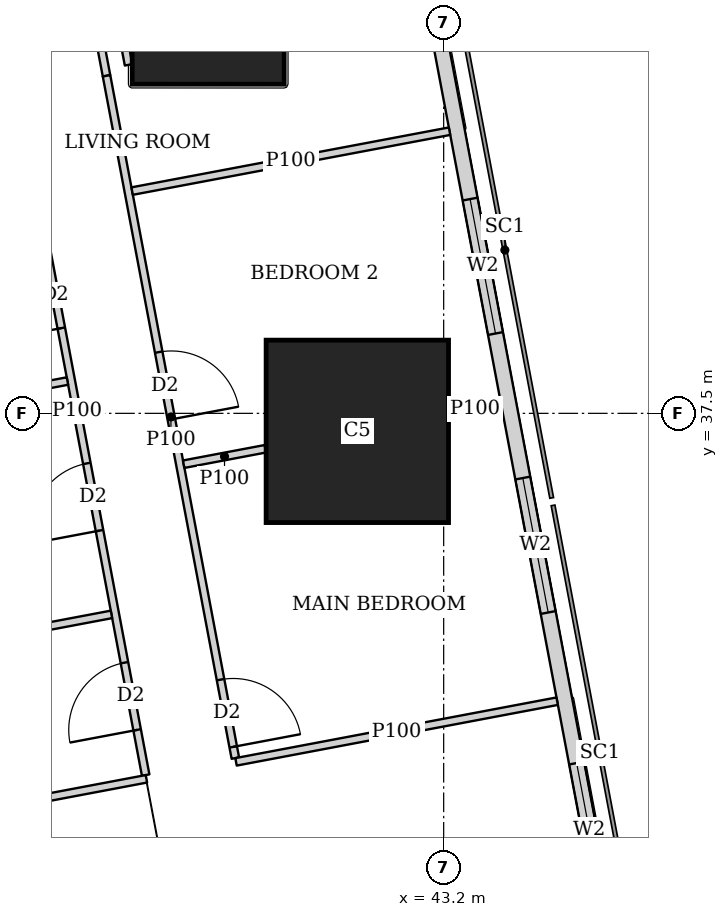
"""IFC4 building model, lengths in metres.
Left out: names, types, materials, properties, quantities, classifications, styles, units other than length and angle.
Written with IfcOpenShell. Run it as: python <this file> out.ifc"""

import sys

from ifc_helpers import new_model, si_unit, direction, frame, frame_2d, origin, origin_2d, place, context, subcontext, project, spatial, rectangle, extrude, element, fill, save


model = new_model("IFC4")
c1 = context("Model", 3, precision=1e-05, world=origin(), true_north=direction((0.0, 1.0)))
c2 = subcontext(c1, "Body", "Model", "MODEL_VIEW")
j1 = project(units=[si_unit("LENGTHUNIT", "METRE"), si_unit("PLANEANGLEUNIT", "RADIAN")], contexts=[c1])
p1 = place(None, origin())
s1 = spatial("IfcSite", under=j1, at=p1, CompositionType="ELEMENT")
p2 = place(p1, origin())
s2 = spatial("IfcBuilding", under=s1, at=p2, CompositionType="ELEMENT")
p3 = place(p2, frame((0.0, 0.0, 242.45)))
s3 = spatial("IfcBuildingStorey", under=s2, at=p3, CompositionType="ELEMENT", Elevation=242.45)
p4 = place(p3, frame((42.064, 37.263, 0.0), z_axis=(0.0, 0.0, 1.0), x_axis=(1.0, 0.0, 0.0)))
e1 = element("IfcColumn", 1, at=p4, inside=s3, PredefinedType="COLUMN", context=c2, shape_type="SweptSolid", body=[
    extrude(rectangle(XDim=2.4, YDim=2.4, at=origin_2d()), origin(), (0.0, 0.0, 1.0), 3.75),
])
p5 = place(p3, frame((40.102, 42.83, 0.0), z_axis=(0.0, 0.0, 1.0), x_axis=(1.0, 0.0, 0.0)))
e2 = element("IfcColumn", 2, at=p5, inside=s3, PredefinedType="COLUMN", context=c2, shape_type="SweptSolid", body=[
    extrude(rectangle(XDim=2.0, YDim=2.0, at=origin_2d()), origin(), (0.0, 0.0, 1.0), 3.75),
])
p6 = place(p3, frame((50.653, 2.703, 0.0), z_axis=(0.0, 0.0, 1.0), x_axis=(-0.185612026696, 0.982623109613, 0.0)))
e3 = element("IfcWall", 3, at=p6, inside=s3, PredefinedType="SOLIDWALL", context=c2, shape_type="SweptSolid", body=[
    extrude(rectangle(XDim=41.393, YDim=0.2, at=frame_2d((20.697, 0.0))), origin(), (0.0, 0.0, 1.0), 3.45),
])
p7 = place(p6, frame((1.633, 0.0, 0.9)))
e4 = element("IfcOpeningElement", 4, at=p7, cuts=e3, PredefinedType="OPENING", context=c2, shape_type="SweptSolid", body=[
    extrude(rectangle(XDim=1.8, YDim=1.5, at=frame_2d((0.9, 0.75))), frame((0.0, 0.11, 0.0), z_axis=(0.0, -1.0, 0.0), x_axis=(1.0, 0.0, 0.0)), (0.0, 0.0, 1.0), 0.22),
])
p8 = place(p6, frame((6.032, 0.0, 0.9)))
e5 = element("IfcOpeningElement", 5, at=p8, cuts=e3, PredefinedType="OPENING", context=c2, shape_type="SweptSolid", body=[
    extrude(rectangle(XDim=1.8, YDim=1.5, at=frame_2d((0.9, 0.75))), frame((0.0, 0.11, 0.0), z_axis=(0.0, -1.0, 0.0), x_axis=(1.0, 0.0, 0.0)), (0.0, 0.0, 1.0), 0.22),
])
p9 = place(p6, frame((9.848, 0.0, 0.9)))
e6 = element("IfcOpeningElement", 6, at=p9, cuts=e3, PredefinedType="OPENING", context=c2, shape_type="SweptSolid", body=[
    extrude(rectangle(XDim=1.8, YDim=1.5, at=frame_2d((0.9, 0.75))), frame((0.0, 0.11, 0.0), z_axis=(0.0, -1.0, 0.0), x_axis=(1.0, 0.0, 0.0)), (0.0, 0.0, 1.0), 0.22),
])
p10 = place(p6, frame((13.664, 0.0, 0.9)))
e7 = element("IfcOpeningElement", 7, at=p10, cuts=e3, PredefinedType="OPENING", context=c2, shape_type="SweptSolid", body=[
    extrude(rectangle(XDim=1.8, YDim=1.5, at=frame_2d((0.9, 0.75))), frame((0.0, 0.11, 0.0), z_axis=(0.0, -1.0, 0.0), x_axis=(1.0, 0.0, 0.0)), (0.0, 0.0, 1.0), 0.22),
])
p11 = place(p6, frame((17.481, 0.0, 0.9)))
e8 = element("IfcOpeningElement", 8, at=p11, cuts=e3, PredefinedType="OPENING", context=c2, shape_type="SweptSolid", body=[
    extrude(rectangle(XDim=1.8, YDim=1.5, at=frame_2d((0.9, 0.75))), frame((0.0, 0.11, 0.0), z_axis=(0.0, -1.0, 0.0), x_axis=(1.0, 0.0, 0.0)), (0.0, 0.0, 1.0), 0.22),
])
p12 = place(p6, frame((21.297, 0.0, 0.9)))
e9 = element("IfcOpeningElement", 9, at=p12, cuts=e3, PredefinedType="OPENING", context=c2, shape_type="SweptSolid", body=[
    extrude(rectangle(XDim=1.8, YDim=1.5, at=frame_2d((0.9, 0.75))), frame((0.0, 0.11, 0.0), z_axis=(0.0, -1.0, 0.0), x_axis=(1.0, 0.0, 0.0)), (0.0, 0.0, 1.0), 0.22),
])
p13 = place(p6, frame((25.113, 0.0, 0.9)))
e10 = element("IfcOpeningElement", 10, at=p13, cuts=e3, PredefinedType="OPENING", context=c2, shape_type="SweptSolid", body=[
    extrude(rectangle(XDim=1.8, YDim=1.5, at=frame_2d((0.9, 0.75))), frame((0.0, 0.11, 0.0), z_axis=(0.0, -1.0, 0.0), x_axis=(1.0, 0.0, 0.0)), (0.0, 0.0, 1.0), 0.22),
])
p14 = place(p6, frame((28.93, 0.0, 0.9)))
e11 = element("IfcOpeningElement", 11, at=p14, cuts=e3, PredefinedType="OPENING", context=c2, shape_type="SweptSolid", body=[
    extrude(rectangle(XDim=1.8, YDim=1.5, at=frame_2d((0.9, 0.75))), frame((0.0, 0.11, 0.0), z_axis=(0.0, -1.0, 0.0), x_axis=(1.0, 0.0, 0.0)), (0.0, 0.0, 1.0), 0.22),
])
p15 = place(p6, frame((32.746, 0.0, 0.9)))
e12 = element("IfcOpeningElement", 12, at=p15, cuts=e3, PredefinedType="OPENING", context=c2, shape_type="SweptSolid", body=[
    extrude(rectangle(XDim=1.8, YDim=1.5, at=frame_2d((0.9, 0.75))), frame((0.0, 0.11, 0.0), z_axis=(0.0, -1.0, 0.0), x_axis=(1.0, 0.0, 0.0)), (0.0, 0.0, 1.0), 0.22),
])
p16 = place(p6, frame((36.481, 0.0, 0.9)))
e13 = element("IfcOpeningElement", 13, at=p16, cuts=e3, PredefinedType="OPENING", context=c2, shape_type="SweptSolid", body=[
    extrude(rectangle(XDim=1.8, YDim=1.5, at=frame_2d((0.9, 0.75))), frame((0.0, 0.11, 0.0), z_axis=(0.0, -1.0, 0.0), x_axis=(1.0, 0.0, 0.0)), (0.0, 0.0, 1.0), 0.22),
])
p17 = place(p3, frame((33.933, 42.73, 0.0), z_axis=(0.0, 0.0, 1.0), x_axis=(0.185595417643, -0.982626246825, 0.0)))
e14 = element("IfcWall", 14, at=p17, inside=s3, PredefinedType="SOLIDWALL", context=c2, shape_type="SweptSolid", body=[
    extrude(rectangle(XDim=41.051, YDim=0.15, at=frame_2d((20.525, 0.0))), origin(), (0.0, 0.0, 1.0), 2.45),
])
p18 = place(p17, frame((12.266, 0.0, 0.0)))
e15 = element("IfcOpeningElement", 15, at=p18, cuts=e14, PredefinedType="OPENING", context=c2, shape_type="SweptSolid", body=[
    extrude(rectangle(XDim=1.0, YDim=2.1, at=frame_2d((0.5, 1.05))), frame((0.0, 0.085, 0.0), z_axis=(0.0, -1.0, 0.0), x_axis=(1.0, 0.0, 0.0)), (0.0, 0.0, 1.0), 0.17),
])
p19 = place(p17, frame((16.082, 0.0, 0.0)))
e16 = element("IfcOpeningElement", 16, at=p19, cuts=e14, PredefinedType="OPENING", context=c2, shape_type="SweptSolid", body=[
    extrude(rectangle(XDim=1.0, YDim=2.1, at=frame_2d((0.5, 1.05))), frame((0.0, 0.085, 0.0), z_axis=(0.0, -1.0, 0.0), x_axis=(1.0, 0.0, 0.0)), (0.0, 0.0, 1.0), 0.17),
])
p20 = place(p17, frame((30.862, 0.0, 0.0)))
e17 = element("IfcOpeningElement", 17, at=p20, cuts=e14, PredefinedType="OPENING", context=c2, shape_type="SweptSolid", body=[
    extrude(rectangle(XDim=1.0, YDim=2.1, at=frame_2d((0.5, 1.05))), frame((0.0, 0.085, 0.0), z_axis=(0.0, -1.0, 0.0), x_axis=(1.0, 0.0, 0.0)), (0.0, 0.0, 1.0), 0.17),
])
p21 = place(p3, frame((39.054, 42.085, 0.0), z_axis=(0.0, 0.0, 1.0), x_axis=(-0.185791584218, 0.982589175207, 0.0)))
e18 = element("IfcWall", 18, at=p21, inside=s3, PredefinedType="PARTITIONING", context=c2, shape_type="SweptSolid", body=[
    extrude(rectangle(XDim=3.628, YDim=0.1, at=frame_2d((1.814, 0.0))), origin(), (0.0, 0.0, 1.0), 2.0),
])
p22 = place(p3, frame((38.256, 44.628, 0.0), z_axis=(0.0, 0.0, 1.0), x_axis=(0.185700639943, -0.982606366927, 0.0)))
e19 = element("IfcWall", 19, at=p22, inside=s3, PredefinedType="PARTITIONING", context=c2, shape_type="SweptSolid", body=[
    extrude(rectangle(XDim=2.735, YDim=0.1, at=frame_2d((1.367, 0.0))), origin(), (0.0, 0.0, 1.0), 2.0),
])
p23 = place(p3, frame((38.764, 41.941, 0.0), z_axis=(0.0, 0.0, 1.0), x_axis=(0.185548572312, -0.982635093671, 0.0)))
e20 = element("IfcWall", 20, at=p23, inside=s3, PredefinedType="PARTITIONING", context=c2, shape_type="SweptSolid", body=[
    extrude(rectangle(XDim=9.135, YDim=0.1, at=frame_2d((4.568, 0.0))), origin(), (0.0, 0.0, 1.0), 3.45),
])
p24 = place(p23, frame((8.085, 0.0, 0.0)))
e21 = element("IfcOpeningElement", 21, at=p24, cuts=e20, PredefinedType="OPENING", context=c2, shape_type="SweptSolid", body=[
    extrude(rectangle(XDim=0.9, YDim=2.1, at=frame_2d((0.45, 1.05))), frame((0.0, 0.06, 0.0), z_axis=(0.0, -1.0, 0.0), x_axis=(1.0, 0.0, 0.0)), (0.0, 0.0, 1.0), 0.12),
])
p25 = place(p23, frame((3.7, 0.0, 0.0)))
e22 = element("IfcOpeningElement", 22, at=p25, cuts=e20, PredefinedType="OPENING", context=c2, shape_type="SweptSolid", body=[
    extrude(rectangle(XDim=0.9, YDim=2.1, at=frame_2d((0.45, 1.05))), frame((0.0, 0.06, 0.0), z_axis=(0.0, -1.0, 0.0), x_axis=(1.0, 0.0, 0.0)), (0.0, 0.0, 1.0), 0.12),
])
p26 = place(p3, frame((37.473, 42.309, 0.0), z_axis=(0.0, 0.0, 1.0), x_axis=(0.185491912953, -0.982645790827, 0.0)))
e23 = element("IfcWall", 23, at=p26, inside=s3, PredefinedType="PARTITIONING", context=c2, shape_type="SweptSolid", body=[
    extrude(rectangle(XDim=9.737, YDim=0.1, at=frame_2d((4.869, 0.0))), origin(), (0.0, 0.0, 1.0), 3.45),
])
p27 = place(p26, frame((8.232, 0.0, 0.0)))
e24 = element("IfcOpeningElement", 24, at=p27, cuts=e23, PredefinedType="OPENING", context=c2, shape_type="SweptSolid", body=[
    extrude(rectangle(XDim=0.9, YDim=2.1, at=frame_2d((0.45, 1.05))), frame((0.0, 0.06, 0.0), z_axis=(0.0, -1.0, 0.0), x_axis=(1.0, 0.0, 0.0)), (0.0, 0.0, 1.0), 0.12),
])
p28 = place(p26, frame((2.853, 0.0, 0.0)))
e25 = element("IfcOpeningElement", 25, at=p28, cuts=e23, PredefinedType="OPENING", context=c2, shape_type="SweptSolid", body=[
    extrude(rectangle(XDim=0.9, YDim=2.1, at=frame_2d((0.45, 1.05))), frame((0.0, 0.06, 0.0), z_axis=(0.0, -1.0, 0.0), x_axis=(1.0, 0.0, 0.0)), (0.0, 0.0, 1.0), 0.12),
])
p29 = place(p26, frame((5.564, 0.0, 0.0)))
e26 = element("IfcOpeningElement", 26, at=p29, cuts=e23, PredefinedType="OPENING", context=c2, shape_type="SweptSolid", body=[
    extrude(rectangle(XDim=0.9, YDim=2.1, at=frame_2d((0.45, 1.05))), frame((0.0, 0.06, 0.0), z_axis=(0.0, -1.0, 0.0), x_axis=(1.0, 0.0, 0.0)), (0.0, 0.0, 1.0), 0.12),
])
p30 = place(p3, frame((43.277, 41.212, 0.0), z_axis=(0.0, 0.0, 1.0), x_axis=(-0.982665405803, -0.185387972203, 0.0)))
e27 = element("IfcWall", 27, at=p30, inside=s3, PredefinedType="PARTITIONING", context=c2, shape_type="SweptSolid", body=[
    extrude(rectangle(XDim=4.25, YDim=0.1, at=frame_2d((2.125, 0.0))), origin(), (0.0, 0.0, 1.0), 2.0),
])
p31 = place(p3, frame((43.955, 37.62, 0.0), z_axis=(0.0, 0.0, 1.0), x_axis=(-0.982495415327, -0.186286765128, 0.0)))
e28 = element("IfcWall", 28, at=p31, inside=s3, PredefinedType="PARTITIONING", context=c2, shape_type="SweptSolid", body=[
    extrude(rectangle(XDim=0.693, YDim=0.1, at=frame_2d((0.347, 0.0))), origin(), (0.0, 0.0, 1.0), 3.45),
])
p32 = place(p3, frame((40.854, 37.034, 0.0), z_axis=(0.0, 0.0, 1.0), x_axis=(-0.982651678759, -0.185460718839, 0.0)))
e29 = element("IfcWall", 29, at=p32, inside=s3, PredefinedType="PARTITIONING", context=c2, shape_type="SweptSolid", body=[
    extrude(rectangle(XDim=1.094, YDim=0.1, at=frame_2d((0.547, 0.0))), origin(), (0.0, 0.0, 1.0), 3.45),
])
p33 = place(p3, frame((44.693, 33.713, 0.0), z_axis=(0.0, 0.0, 1.0), x_axis=(-0.982633535512, -0.185556823879, 0.0)))
e30 = element("IfcWall", 30, at=p33, inside=s3, PredefinedType="PARTITIONING", context=c2, shape_type="SweptSolid", body=[
    extrude(rectangle(XDim=4.3, YDim=0.1, at=frame_2d((2.15, 0.0))), origin(), (0.0, 0.0, 1.0), 2.0),
])
p34 = place(p3, frame((38.25, 37.925, 0.0), z_axis=(0.0, 0.0, 1.0), x_axis=(-0.982610209589, -0.185680305934, 0.0)))
e31 = element("IfcWall", 31, at=p34, inside=s3, PredefinedType="PARTITIONING", context=c2, shape_type="SweptSolid", body=[
    extrude(rectangle(XDim=1.567, YDim=0.1, at=frame_2d((0.784, 0.0))), origin(), (0.0, 0.0, 1.0), 3.45),
])
p35 = place(p3, frame((39.289, 32.692, 0.0), z_axis=(0.0, 0.0, 1.0), x_axis=(-0.982633623707, -0.185556356831, 0.0)))
e32 = element("IfcWall", 32, at=p35, inside=s3, PredefinedType="PARTITIONING", context=c2, shape_type="SweptSolid", body=[
    extrude(rectangle(XDim=3.325, YDim=0.1, at=frame_2d((1.663, 0.0))), origin(), (0.0, 0.0, 1.0), 3.45),
])
p36 = place(p3, frame((38.829, 34.855, 0.0), z_axis=(0.0, 0.0, 1.0), x_axis=(-0.982610347627, -0.185679575441, 0.0)))
e33 = element("IfcWall", 33, at=p36, inside=s3, PredefinedType="PARTITIONING", context=c2, shape_type="SweptSolid", body=[
    extrude(rectangle(XDim=3.274, YDim=0.1, at=frame_2d((1.637, 0.0))), origin(), (0.0, 0.0, 1.0), 3.45),
])
p37 = place(p3, frame((38.202, 10.163, 0.0), z_axis=(0.0, 0.0, 1.0), x_axis=(-0.185610321132, 0.982623431783, 0.0)))
e34 = element("IfcWall", 34, at=p37, inside=s3, PredefinedType="PARTITIONING", context=c2, shape_type="SweptSolid", body=[
    extrude(rectangle(XDim=25.111, YDim=0.125, at=frame_2d((12.556, 0.0))), origin(), (0.0, 0.0, 1.0), 2.45),
])
p38 = place(p37, frame((0.708, 0.0, 0.0)))
e35 = element("IfcOpeningElement", 35, at=p38, cuts=e34, PredefinedType="OPENING", context=c2, shape_type="SweptSolid", body=[
    extrude(rectangle(XDim=1.0, YDim=2.1, at=frame_2d((0.5, 1.05))), frame((0.0, 0.073, 0.0), z_axis=(0.0, -1.0, 0.0), x_axis=(1.0, 0.0, 0.0)), (0.0, 0.0, 1.0), 0.145),
])
p39 = place(p37, frame((13.378, 0.0, 0.0)))
e36 = element("IfcOpeningElement", 36, at=p39, cuts=e34, PredefinedType="OPENING", context=c2, shape_type="SweptSolid", body=[
    extrude(rectangle(XDim=1.0, YDim=2.1, at=frame_2d((0.5, 1.05))), frame((0.0, 0.073, 0.0), z_axis=(0.0, -1.0, 0.0), x_axis=(1.0, 0.0, 0.0)), (0.0, 0.0, 1.0), 0.145),
])
p40 = place(p37, frame((21.15, 0.0, 0.0)))
e37 = element("IfcOpeningElement", 37, at=p40, cuts=e34, PredefinedType="OPENING", context=c2, shape_type="SweptSolid", body=[
    extrude(rectangle(XDim=1.0, YDim=2.1, at=frame_2d((0.5, 1.05))), frame((0.0, 0.073, 0.0), z_axis=(0.0, -1.0, 0.0), x_axis=(1.0, 0.0, 0.0)), (0.0, 0.0, 1.0), 0.145),
])
p41 = place(p37, frame((23.453, 0.0, 0.0)))
e38 = element("IfcOpeningElement", 38, at=p41, cuts=e34, PredefinedType="OPENING", context=c2, shape_type="SweptSolid", body=[
    extrude(rectangle(XDim=1.0, YDim=2.1, at=frame_2d((0.5, 1.05))), frame((0.0, 0.073, 0.0), z_axis=(0.0, -1.0, 0.0), x_axis=(1.0, 0.0, 0.0)), (0.0, 0.0, 1.0), 0.145),
])
p42 = place(p14, origin())
e39 = element("IfcWindow", 39, at=p42, inside=s3, PartitioningType="SINGLE_PANEL", PredefinedType="WINDOW", context=c2, shape_type="SweptSolid", body=[
    extrude(rectangle(XDim=1.8, YDim=1.5, at=frame_2d((0.9, 0.75))), frame((0.0, 0.03, 0.0), z_axis=(0.0, -1.0, 0.0), x_axis=(1.0, 0.0, 0.0)), (0.0, 0.0, 1.0), 0.06),
])
fill(e11, e39)
p43 = place(p15, origin())
e40 = element("IfcWindow", 40, at=p43, inside=s3, PartitioningType="SINGLE_PANEL", PredefinedType="WINDOW", context=c2, shape_type="SweptSolid", body=[
    extrude(rectangle(XDim=1.8, YDim=1.5, at=frame_2d((0.9, 0.75))), frame((0.0, 0.03, 0.0), z_axis=(0.0, -1.0, 0.0), x_axis=(1.0, 0.0, 0.0)), (0.0, 0.0, 1.0), 0.06),
])
fill(e12, e40)
p44 = place(p16, origin())
e41 = element("IfcWindow", 41, at=p44, inside=s3, PartitioningType="SINGLE_PANEL", PredefinedType="WINDOW", context=c2, shape_type="SweptSolid", body=[
    extrude(rectangle(XDim=1.8, YDim=1.5, at=frame_2d((0.9, 0.75))), frame((0.0, 0.03, 0.0), z_axis=(0.0, -1.0, 0.0), x_axis=(1.0, 0.0, 0.0)), (0.0, 0.0, 1.0), 0.06),
])
fill(e13, e41)
p45 = place(p24, origin())
e42 = element("IfcDoor", 42, at=p45, inside=s3, OperationType="SINGLE_SWING_RIGHT", PredefinedType="DOOR", context=c2, shape_type="SweptSolid", body=[
    extrude(rectangle(XDim=0.9, YDim=2.1, at=frame_2d((0.45, 1.05))), frame((0.0, 0.025, 0.0), z_axis=(0.0, -1.0, 0.0), x_axis=(1.0, 0.0, 0.0)), (0.0, 0.0, 1.0), 0.05),
])
fill(e21, e42)
p46 = place(p25, origin())
e43 = element("IfcDoor", 43, at=p46, inside=s3, OperationType="SINGLE_SWING_RIGHT", PredefinedType="DOOR", context=c2, shape_type="SweptSolid", body=[
    extrude(rectangle(XDim=0.9, YDim=2.1, at=frame_2d((0.45, 1.05))), frame((0.0, 0.025, 0.0), z_axis=(0.0, -1.0, 0.0), x_axis=(1.0, 0.0, 0.0)), (0.0, 0.0, 1.0), 0.05),
])
fill(e22, e43)
p47 = place(p27, origin())
e44 = element("IfcDoor", 44, at=p47, inside=s3, OperationType="SINGLE_SWING_LEFT", PredefinedType="DOOR", context=c2, shape_type="SweptSolid", body=[
    extrude(rectangle(XDim=0.9, YDim=2.1, at=frame_2d((0.45, 1.05))), frame((0.0, 0.025, 0.0), z_axis=(0.0, -1.0, 0.0), x_axis=(1.0, 0.0, 0.0)), (0.0, 0.0, 1.0), 0.05),
])
fill(e24, e44)
p48 = place(p28, origin())
e45 = element("IfcDoor", 45, at=p48, inside=s3, OperationType="SINGLE_SWING_LEFT", PredefinedType="DOOR", context=c2, shape_type="SweptSolid", body=[
    extrude(rectangle(XDim=0.9, YDim=2.1, at=frame_2d((0.45, 1.05))), frame((0.0, 0.025, 0.0), z_axis=(0.0, -1.0, 0.0), x_axis=(1.0, 0.0, 0.0)), (0.0, 0.0, 1.0), 0.05),
])
fill(e25, e45)
p49 = place(p29, origin())
e46 = element("IfcDoor", 46, at=p49, inside=s3, OperationType="SINGLE_SWING_LEFT", PredefinedType="DOOR", context=c2, shape_type="SweptSolid", body=[
    extrude(rectangle(XDim=0.9, YDim=2.1, at=frame_2d((0.45, 1.05))), frame((0.0, 0.025, 0.0), z_axis=(0.0, -1.0, 0.0), x_axis=(1.0, 0.0, 0.0)), (0.0, 0.0, 1.0), 0.05),
])
fill(e26, e46)
save(model, sys.argv[1])
